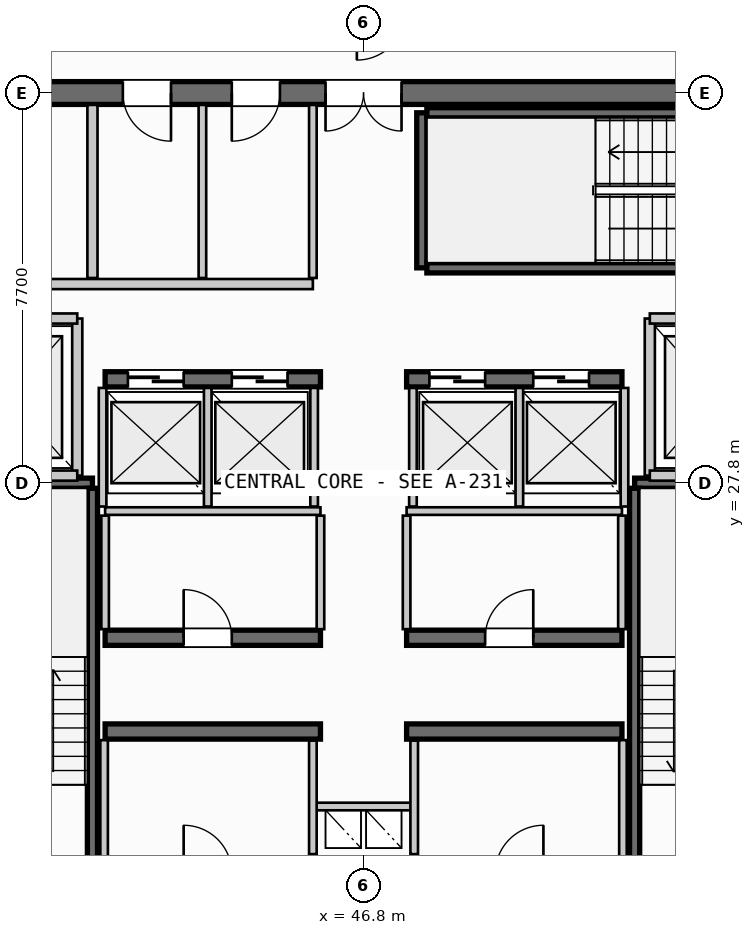
"""IFC4 building model, lengths in metres.
Left out: names, types, materials, properties, quantities, classifications, styles, units other than length and angle.
Written with IfcOpenShell. Run it as: python <this file> out.ifc"""

import sys

from ifc_helpers import new_model, si_unit, direction, frame, frame_2d, origin, place, context, subcontext, project, spatial, rectangle, extrude, source, transform, mapped, element, fill, save


model = new_model("IFC4")
c1 = context("Model", 3, precision=1e-05, world=origin(), true_north=direction((0.0, 1.0)))
c2 = subcontext(c1, "Body", "Model", "MODEL_VIEW")
j1 = project(units=[si_unit("LENGTHUNIT", "METRE"), si_unit("PLANEANGLEUNIT", "RADIAN")], contexts=[c1])
p1 = place(None, origin())
s1 = spatial("IfcSite", under=j1, at=p1, CompositionType="ELEMENT")
p2 = place(p1, origin())
s2 = spatial("IfcBuilding", under=s1, at=p2, CompositionType="ELEMENT")
p3 = place(p2, frame((0.0, 0.0, 228.4)))
s3 = spatial("IfcBuildingStorey", under=s2, at=p3, CompositionType="ELEMENT", Elevation=228.4)
p4 = place(p3, frame((55.6, 35.5, 0.0), z_axis=(0.0, 0.0, 1.0), x_axis=(-1.0, 0.0, 0.0)))
e1 = element("IfcWall", 1, at=p4, inside=s3, PredefinedType="SHEAR", context=c2, shape_type="SweptSolid", body=[
    extrude(rectangle(XDim=17.6, YDim=0.45, at=frame_2d((8.8, 0.0))), origin(), (0.0, 0.0, 1.0), 3.21),
])
p5 = place(p4, frame((8.05, 0.0, 0.0)))
e2 = element("IfcOpeningElement", 2, at=p5, cuts=e1, PredefinedType="OPENING", context=c2, shape_type="SweptSolid", body=[
    extrude(rectangle(XDim=1.5, YDim=2.2, at=frame_2d((0.75, 1.1))), frame((0.0, 0.235, 0.0), z_axis=(0.0, -1.0, 0.0), x_axis=(1.0, 0.0, 0.0)), (0.0, 0.0, 1.0), 0.47),
])
p6 = place(p4, frame((15.1, 0.0, 0.0)))
e3 = element("IfcOpeningElement", 3, at=p6, cuts=e1, PredefinedType="OPENING", context=c2, shape_type="SweptSolid", body=[
    extrude(rectangle(XDim=0.95, YDim=2.15, at=frame_2d((0.475, 1.075))), frame((0.0, 0.235, 0.0), z_axis=(0.0, -1.0, 0.0), x_axis=(1.0, 0.0, 0.0)), (0.0, 0.0, 1.0), 0.47),
])
p7 = place(p4, frame((12.6, 0.0, 0.0)))
e4 = element("IfcOpeningElement", 4, at=p7, cuts=e1, PredefinedType="OPENING", context=c2, shape_type="SweptSolid", body=[
    extrude(rectangle(XDim=0.95, YDim=2.15, at=frame_2d((0.475, 1.075))), frame((0.0, 0.235, 0.0), z_axis=(0.0, -1.0, 0.0), x_axis=(1.0, 0.0, 0.0)), (0.0, 0.0, 1.0), 0.47),
])
p8 = place(p4, frame((10.45, 0.0, 0.0)))
e5 = element("IfcOpeningElement", 5, at=p8, cuts=e1, PredefinedType="OPENING", context=c2, shape_type="SweptSolid", body=[
    extrude(rectangle(XDim=0.95, YDim=2.15, at=frame_2d((0.475, 1.075))), frame((0.0, 0.235, 0.0), z_axis=(0.0, -1.0, 0.0), x_axis=(1.0, 0.0, 0.0)), (0.0, 0.0, 1.0), 0.47),
])
for number, where, z_axis, x_axis in (
    (6, (41.7, 22.9, 0.0), (0.0, 0.0, 1.0), (1.0, 0.0, 0.0)),
    (7, (47.65, 22.9, 0.0), (0.0, 0.0, 1.0), (1.0, 0.0, 0.0)),
):
    element("IfcWall", number, at=place(p3, frame(where, z_axis=z_axis, x_axis=x_axis)), inside=s3, PredefinedType="SHEAR", context=c2, shape_type="SweptSolid", body=[
        extrude(rectangle(XDim=4.25, YDim=0.3, at=frame_2d((2.125, 0.0))), origin(), (0.0, 0.0, 1.0), 3.21),
    ])
p9 = place(p3, frame((41.7, 24.75, 0.0), z_axis=(0.0, 0.0, 1.0), x_axis=(1.0, 0.0, 0.0)))
e8 = element("IfcWall", 8, at=p9, inside=s3, PredefinedType="SHEAR", context=c2, shape_type="SweptSolid", body=[
    extrude(rectangle(XDim=4.25, YDim=0.3, at=frame_2d((2.125, 0.0))), origin(), (0.0, 0.0, 1.0), 3.21),
])
p10 = place(p9, frame((1.55, 0.0, 0.0)))
e9 = element("IfcOpeningElement", 9, at=p10, cuts=e8, PredefinedType="OPENING", context=c2, shape_type="SweptSolid", body=[
    extrude(rectangle(XDim=0.95, YDim=2.15, at=frame_2d((0.475, 1.075))), frame((0.0, 0.16, 0.0), z_axis=(0.0, -1.0, 0.0), x_axis=(1.0, 0.0, 0.0)), (0.0, 0.0, 1.0), 0.32),
])
p11 = place(p3, frame((47.65, 24.75, 0.0), z_axis=(0.0, 0.0, 1.0), x_axis=(1.0, 0.0, 0.0)))
e10 = element("IfcWall", 10, at=p11, inside=s3, PredefinedType="SHEAR", context=c2, shape_type="SweptSolid", body=[
    extrude(rectangle(XDim=4.25, YDim=0.3, at=frame_2d((2.125, 0.0))), origin(), (0.0, 0.0, 1.0), 3.21),
])
p12 = place(p11, frame((1.55, 0.0, 0.0)))
e11 = element("IfcOpeningElement", 11, at=p12, cuts=e10, PredefinedType="OPENING", context=c2, shape_type="SweptSolid", body=[
    extrude(rectangle(XDim=0.95, YDim=2.15, at=frame_2d((0.475, 1.075))), frame((0.0, 0.16, 0.0), z_axis=(0.0, -1.0, 0.0), x_axis=(1.0, 0.0, 0.0)), (0.0, 0.0, 1.0), 0.32),
])
p13 = place(p3, frame((41.7, 29.85, 0.0), z_axis=(0.0, 0.0, 1.0), x_axis=(1.0, 0.0, 0.0)))
e12 = element("IfcWall", 12, at=p13, inside=s3, PredefinedType="SHEAR", context=c2, shape_type="SweptSolid", body=[
    extrude(rectangle(XDim=4.25, YDim=0.3, at=frame_2d((2.125, 0.0))), origin(), (0.0, 0.0, 1.0), 3.21),
])
p14 = place(p13, frame((0.45, 0.0, 0.0)))
e13 = element("IfcOpeningElement", 13, at=p14, cuts=e12, PredefinedType="OPENING", context=c2, shape_type="SweptSolid", body=[
    extrude(rectangle(XDim=1.1, YDim=2.2, at=frame_2d((0.55, 1.1))), frame((0.0, 0.16, 0.0), z_axis=(0.0, -1.0, 0.0), x_axis=(1.0, 0.0, 0.0)), (0.0, 0.0, 1.0), 0.32),
])
p15 = place(p13, frame((2.5, 0.0, 0.0)))
e14 = element("IfcOpeningElement", 14, at=p15, cuts=e12, PredefinedType="OPENING", context=c2, shape_type="SweptSolid", body=[
    extrude(rectangle(XDim=1.1, YDim=2.2, at=frame_2d((0.55, 1.1))), frame((0.0, 0.16, 0.0), z_axis=(0.0, -1.0, 0.0), x_axis=(1.0, 0.0, 0.0)), (0.0, 0.0, 1.0), 0.32),
])
p16 = place(p3, frame((47.65, 29.85, 0.0), z_axis=(0.0, 0.0, 1.0), x_axis=(1.0, 0.0, 0.0)))
e15 = element("IfcWall", 15, at=p16, inside=s3, PredefinedType="SHEAR", context=c2, shape_type="SweptSolid", body=[
    extrude(rectangle(XDim=4.25, YDim=0.3, at=frame_2d((2.125, 0.0))), origin(), (0.0, 0.0, 1.0), 3.21),
])
p17 = place(p16, frame((0.45, 0.0, 0.0)))
e16 = element("IfcOpeningElement", 16, at=p17, cuts=e15, PredefinedType="OPENING", context=c2, shape_type="SweptSolid", body=[
    extrude(rectangle(XDim=1.1, YDim=2.2, at=frame_2d((0.55, 1.1))), frame((0.0, 0.16, 0.0), z_axis=(0.0, -1.0, 0.0), x_axis=(1.0, 0.0, 0.0)), (0.0, 0.0, 1.0), 0.32),
])
p18 = place(p16, frame((2.5, 0.0, 0.0)))
e17 = element("IfcOpeningElement", 17, at=p18, cuts=e15, PredefinedType="OPENING", context=c2, shape_type="SweptSolid", body=[
    extrude(rectangle(XDim=1.1, YDim=2.2, at=frame_2d((0.55, 1.1))), frame((0.0, 0.16, 0.0), z_axis=(0.0, -1.0, 0.0), x_axis=(1.0, 0.0, 0.0)), (0.0, 0.0, 1.0), 0.32),
])
p19 = place(p3, frame((38.39, 27.8, 0.0), z_axis=(0.0, 0.0, 1.0), x_axis=(1.0, 0.0, 0.0)))
e18 = element("IfcWall", 18, at=p19, inside=s3, PredefinedType="SHEAR", context=c2, shape_type="SweptSolid", body=[
    extrude(rectangle(XDim=3.06, YDim=0.2, at=frame_2d((1.53, 0.0))), origin(), (0.0, 0.0, 1.0), 3.21),
])
p20 = place(p3, frame((41.45, 27.7, 0.0), z_axis=(0.0, 0.0, 1.0), x_axis=(0.0, -1.0, 0.0)))
e19 = element("IfcWall", 19, at=p20, inside=s3, PredefinedType="SHEAR", context=c2, shape_type="SweptSolid", body=[
    extrude(rectangle(XDim=7.35, YDim=0.2, at=frame_2d((3.675, 0.0))), origin(), (0.0, 0.0, 1.0), 3.21),
])
p21 = place(p3, frame((52.15, 27.8, 0.0), z_axis=(0.0, 0.0, 1.0), x_axis=(1.0, 0.0, 0.0)))
e20 = element("IfcWall", 20, at=p21, inside=s3, PredefinedType="SHEAR", context=c2, shape_type="SweptSolid", body=[
    extrude(rectangle(XDim=3.06, YDim=0.2, at=frame_2d((1.53, 0.0))), origin(), (0.0, 0.0, 1.0), 3.21),
])
p22 = place(p3, frame((52.15, 20.35, 0.0), z_axis=(0.0, 0.0, 1.0), x_axis=(0.0, 1.0, 0.0)))
e21 = element("IfcWall", 21, at=p22, inside=s3, PredefinedType="SHEAR", context=c2, shape_type="SweptSolid", body=[
    extrude(rectangle(XDim=7.35, YDim=0.2, at=frame_2d((3.675, 0.0))), origin(), (0.0, 0.0, 1.0), 3.21),
])
p23 = place(p3, frame((47.95, 32.05, 0.0), z_axis=(0.0, 0.0, 1.0), x_axis=(0.0, 1.0, 0.0)))
e22 = element("IfcWall", 22, at=p23, inside=s3, PredefinedType="SHEAR", context=c2, shape_type="SweptSolid", body=[
    extrude(rectangle(XDim=3.06, YDim=0.2, at=frame_2d((1.53, 0.0))), origin(), (0.0, 0.0, 1.0), 3.21),
])
for number, where, z_axis, x_axis in (
    (23, (48.05, 35.11, 0.0), (0.0, 0.0, 1.0), (1.0, 0.0, 0.0)),
    (24, (55.4, 32.05, 0.0), (0.0, 0.0, 1.0), (-1.0, 0.0, 0.0)),
):
    element("IfcWall", number, at=place(p3, frame(where, z_axis=z_axis, x_axis=x_axis)), inside=s3, PredefinedType="SHEAR", context=c2, shape_type="SweptSolid", body=[
        extrude(rectangle(XDim=7.35, YDim=0.2, at=frame_2d((3.675, 0.0))), origin(), (0.0, 0.0, 1.0), 3.21),
    ])
p24 = place(p3, frame((45.8, 21.42, 0.0), z_axis=(0.0, 0.0, 1.0), x_axis=(1.0, 0.0, 0.0)))
e25 = element("IfcWall", 25, at=p24, inside=s3, PredefinedType="PARTITIONING", context=c2, shape_type="SweptSolid", body=[
    extrude(rectangle(XDim=2.0, YDim=0.15, at=frame_2d((1.0, 0.0))), origin(), (0.0, 0.0, 1.0), 2.28),
])
for number, where, z_axis, x_axis in (
    (26, (45.8, 20.48, 0.0), (0.0, 0.0, 1.0), (0.0, 1.0, 0.0)),
    (27, (47.8, 20.48, 0.0), (0.0, 0.0, 1.0), (0.0, 1.0, 0.0)),
):
    element("IfcWall", number, at=place(p3, frame(where, z_axis=z_axis, x_axis=x_axis)), inside=s3, PredefinedType="PARTITIONING", context=c2, shape_type="SweptSolid", body=[
        extrude(rectangle(XDim=2.24, YDim=0.15, at=frame_2d((1.12, 0.0))), origin(), (0.0, 0.0, 1.0), 2.28),
    ])
p25 = place(p3, frame((41.15, 27.95, 0.0), z_axis=(0.0, 0.0, 1.0), x_axis=(0.0, 1.0, 0.0)))
e28 = element("IfcWall", 28, at=p25, inside=s3, PredefinedType="PARTITIONING", context=c2, shape_type="SweptSolid", body=[
    extrude(rectangle(XDim=3.1, YDim=0.2, at=frame_2d((1.55, 0.0))), origin(), (0.0, 0.0, 1.0), 2.28),
])
for number, where, z_axis, x_axis in (
    (29, (38.235, 27.95, 0.0), (0.0, 0.0, 1.0), (1.0, 0.0, 0.0)),
    (30, (38.235, 31.05, 0.0), (0.0, 0.0, 1.0), (1.0, 0.0, 0.0)),
):
    element("IfcWall", number, at=place(p3, frame(where, z_axis=z_axis, x_axis=x_axis)), inside=s3, PredefinedType="PARTITIONING", context=c2, shape_type="SweptSolid", body=[
        extrude(rectangle(XDim=2.915, YDim=0.2, at=frame_2d((1.458, 0.0))), origin(), (0.0, 0.0, 1.0), 2.28),
    ])
p26 = place(p3, frame((52.45, 27.95, 0.0), z_axis=(0.0, 0.0, 1.0), x_axis=(0.0, 1.0, 0.0)))
e31 = element("IfcWall", 31, at=p26, inside=s3, PredefinedType="PARTITIONING", context=c2, shape_type="SweptSolid", body=[
    extrude(rectangle(XDim=3.1, YDim=0.2, at=frame_2d((1.55, 0.0))), origin(), (0.0, 0.0, 1.0), 2.28),
])
for number, where, z_axis, x_axis in (
    (32, (52.45, 27.95, 0.0), (0.0, 0.0, 1.0), (1.0, 0.0, 0.0)),
    (33, (52.45, 31.05, 0.0), (0.0, 0.0, 1.0), (1.0, 0.0, 0.0)),
):
    element("IfcWall", number, at=place(p3, frame(where, z_axis=z_axis, x_axis=x_axis)), inside=s3, PredefinedType="PARTITIONING", context=c2, shape_type="SweptSolid", body=[
        extrude(rectangle(XDim=2.915, YDim=0.2, at=frame_2d((1.458, 0.0))), origin(), (0.0, 0.0, 1.0), 2.28),
    ])
for number, where, z_axis, x_axis in (
    (34, (41.68, 20.335, 0.0), (0.0, 0.0, 1.0), (0.0, 1.0, 0.0)),
    (35, (51.92, 20.335, 0.0), (0.0, 0.0, 1.0), (0.0, 1.0, 0.0)),
):
    element("IfcWall", number, at=place(p3, frame(where, z_axis=z_axis, x_axis=x_axis)), inside=s3, PredefinedType="PARTITIONING", context=c2, shape_type="SweptSolid", body=[
        extrude(rectangle(XDim=2.395, YDim=0.15, at=frame_2d((1.198, 0.0))), origin(), (0.0, 0.0, 1.0), 2.28),
    ])
for number, where, z_axis, x_axis in (
    (36, (41.7, 27.25, 0.0), (0.0, 0.0, 1.0), (1.0, 0.0, 0.0)),
    (37, (47.65, 27.25, 0.0), (0.0, 0.0, 1.0), (1.0, 0.0, 0.0)),
):
    element("IfcWall", number, at=place(p3, frame(where, z_axis=z_axis, x_axis=x_axis)), inside=s3, PredefinedType="PARTITIONING", context=c2, shape_type="SweptSolid", body=[
        extrude(rectangle(XDim=4.25, YDim=0.15, at=frame_2d((2.125, 0.0))), origin(), (0.0, 0.0, 1.0), 2.28),
    ])
for number, where, z_axis, x_axis in (
    (38, (41.7, 24.92, 0.0), (0.0, 0.0, 1.0), (0.0, 1.0, 0.0)),
    (39, (45.95, 24.92, 0.0), (0.0, 0.0, 1.0), (0.0, 1.0, 0.0)),
    (40, (47.65, 24.92, 0.0), (0.0, 0.0, 1.0), (0.0, 1.0, 0.0)),
    (41, (51.9, 24.92, 0.0), (0.0, 0.0, 1.0), (0.0, 1.0, 0.0)),
):
    element("IfcWall", number, at=place(p3, frame(where, z_axis=z_axis, x_axis=x_axis)), inside=s3, PredefinedType="PARTITIONING", context=c2, shape_type="SweptSolid", body=[
        extrude(rectangle(XDim=2.24, YDim=0.15, at=frame_2d((1.12, 0.0))), origin(), (0.0, 0.0, 1.0), 2.28),
    ])
for number, where, z_axis, x_axis in (
    (42, (41.65, 27.34, 0.0), (0.0, 0.0, 1.0), (0.0, 1.0, 0.0)),
    (43, (43.725, 27.34, 0.0), (0.0, 0.0, 1.0), (0.0, 1.0, 0.0)),
    (44, (45.825, 27.34, 0.0), (0.0, 0.0, 1.0), (0.0, 1.0, 0.0)),
    (45, (47.775, 27.34, 0.0), (0.0, 0.0, 1.0), (0.0, 1.0, 0.0)),
    (46, (49.875, 27.34, 0.0), (0.0, 0.0, 1.0), (0.0, 1.0, 0.0)),
    (47, (51.95, 27.34, 0.0), (0.0, 0.0, 1.0), (0.0, 1.0, 0.0)),
):
    element("IfcWall", number, at=place(p3, frame(where, z_axis=z_axis, x_axis=x_axis)), inside=s3, PredefinedType="PARTITIONING", context=c2, shape_type="SweptSolid", body=[
        extrude(rectangle(XDim=2.34, YDim=0.15, at=frame_2d((1.17, 0.0))), origin(), (0.0, 0.0, 1.0), 2.28),
    ])
p27 = place(p3, frame((41.45, 31.85, 0.0), z_axis=(0.0, 0.0, 1.0), x_axis=(0.0, 1.0, 0.0)))
e48 = element("IfcWall", 48, at=p27, inside=s3, PredefinedType="PARTITIONING", context=c2, shape_type="SweptSolid", body=[
    extrude(rectangle(XDim=3.415, YDim=0.2, at=frame_2d((1.708, 0.0))), origin(), (0.0, 0.0, 1.0), 2.28),
])
p28 = place(p3, frame((38.235, 31.73, 0.0), z_axis=(0.0, 0.0, 1.0), x_axis=(1.0, 0.0, 0.0)))
e49 = element("IfcWall", 49, at=p28, inside=s3, PredefinedType="PARTITIONING", context=c2, shape_type="SweptSolid", body=[
    extrude(rectangle(XDim=7.565, YDim=0.2, at=frame_2d((3.782, 0.0))), origin(), (0.0, 0.0, 1.0), 2.28),
])
p29 = place(p3, frame((45.8, 31.85, 0.0), z_axis=(0.0, 0.0, 1.0), x_axis=(0.0, 1.0, 0.0)))
e50 = element("IfcWall", 50, at=p29, inside=s3, PredefinedType="PARTITIONING", context=c2, shape_type="SweptSolid", body=[
    extrude(rectangle(XDim=3.415, YDim=0.15, at=frame_2d((1.708, 0.0))), origin(), (0.0, 0.0, 1.0), 2.28),
])
p30 = place(p3, frame((43.62, 31.85, 0.0), z_axis=(0.0, 0.0, 1.0), x_axis=(0.0, 1.0, 0.0)))
e51 = element("IfcWall", 51, at=p30, inside=s3, PredefinedType="PLUMBINGWALL", context=c2, shape_type="SweptSolid", body=[
    extrude(rectangle(XDim=3.415, YDim=0.15, at=frame_2d((1.708, 0.0))), origin(), (0.0, 0.0, 1.0), 2.28),
])
m1 = source(origin(), c2, "Body", "SweptSolid", [
    extrude(rectangle(XDim=1.5, YDim=2.2, at=frame_2d((0.75, 1.1))), frame((0.0, 0.025, 0.0), z_axis=(0.0, -1.0, 0.0), x_axis=(1.0, 0.0, 0.0)), (0.0, 0.0, 1.0), 0.05),
])
p31 = place(p5, origin())
e52 = element("IfcDoor", 52, at=p31, inside=s3, OperationType="DOUBLE_DOOR_SINGLE_SWING", PredefinedType="DOOR", context=c2, shape_type="MappedRepresentation", body=[
    mapped(m1, transform((0.0, 0.0, 0.0), scale=1.0)),
])
fill(e2, e52)
m2 = source(origin(), c2, "Body", "SweptSolid", [
    extrude(rectangle(XDim=0.95, YDim=2.15, at=frame_2d((0.475, 1.075))), frame((0.0, 0.025, 0.0), z_axis=(0.0, -1.0, 0.0), x_axis=(1.0, 0.0, 0.0)), (0.0, 0.0, 1.0), 0.05),
])
p32 = place(p10, origin())
e53 = element("IfcDoor", 53, at=p32, inside=s3, OperationType="SINGLE_SWING_LEFT", PredefinedType="DOOR", context=c2, shape_type="MappedRepresentation", body=[
    mapped(m2, transform((0.0, 0.0, 0.0), scale=1.0)),
])
fill(e9, e53)
p33 = place(p12, origin())
e54 = element("IfcDoor", 54, at=p33, inside=s3, OperationType="SINGLE_SWING_RIGHT", PredefinedType="DOOR", context=c2, shape_type="MappedRepresentation", body=[
    mapped(m2, transform((0.0, 0.0, 0.0), scale=1.0)),
])
fill(e11, e54)
m3 = source(origin(), c2, "Body", "SweptSolid", [
    extrude(rectangle(XDim=1.1, YDim=2.2, at=frame_2d((0.55, 1.1))), frame((0.0, 0.025, 0.0), z_axis=(0.0, -1.0, 0.0), x_axis=(1.0, 0.0, 0.0)), (0.0, 0.0, 1.0), 0.05),
])
p34 = place(p14, origin())
e55 = element("IfcDoor", 55, at=p34, inside=s3, OperationType="SLIDING_TO_LEFT", PredefinedType="DOOR", context=c2, shape_type="MappedRepresentation", body=[
    mapped(m3, transform((0.0, 0.0, 0.0), scale=1.0)),
])
fill(e13, e55)
p35 = place(p15, origin())
e56 = element("IfcDoor", 56, at=p35, inside=s3, OperationType="SLIDING_TO_LEFT", PredefinedType="DOOR", context=c2, shape_type="MappedRepresentation", body=[
    mapped(m3, transform((0.0, 0.0, 0.0), scale=1.0)),
])
fill(e14, e56)
p36 = place(p17, origin())
e57 = element("IfcDoor", 57, at=p36, inside=s3, OperationType="SLIDING_TO_LEFT", PredefinedType="DOOR", context=c2, shape_type="MappedRepresentation", body=[
    mapped(m3, transform((0.0, 0.0, 0.0), scale=1.0)),
])
fill(e16, e57)
p37 = place(p18, origin())
e58 = element("IfcDoor", 58, at=p37, inside=s3, OperationType="SLIDING_TO_LEFT", PredefinedType="DOOR", context=c2, shape_type="MappedRepresentation", body=[
    mapped(m3, transform((0.0, 0.0, 0.0), scale=1.0)),
])
fill(e17, e58)
p38 = place(p7, origin())
e59 = element("IfcDoor", 59, at=p38, inside=s3, OperationType="SINGLE_SWING_LEFT", PredefinedType="DOOR", context=c2, shape_type="MappedRepresentation", body=[
    mapped(m2, transform((0.0, 0.0, 0.0), scale=1.0)),
])
fill(e4, e59)
p39 = place(p8, origin())
e60 = element("IfcDoor", 60, at=p39, inside=s3, OperationType="SINGLE_SWING_RIGHT", PredefinedType="DOOR", context=c2, shape_type="MappedRepresentation", body=[
    mapped(m2, transform((0.0, 0.0, 0.0), scale=1.0)),
])
fill(e5, e60)
save(model, sys.argv[1])
